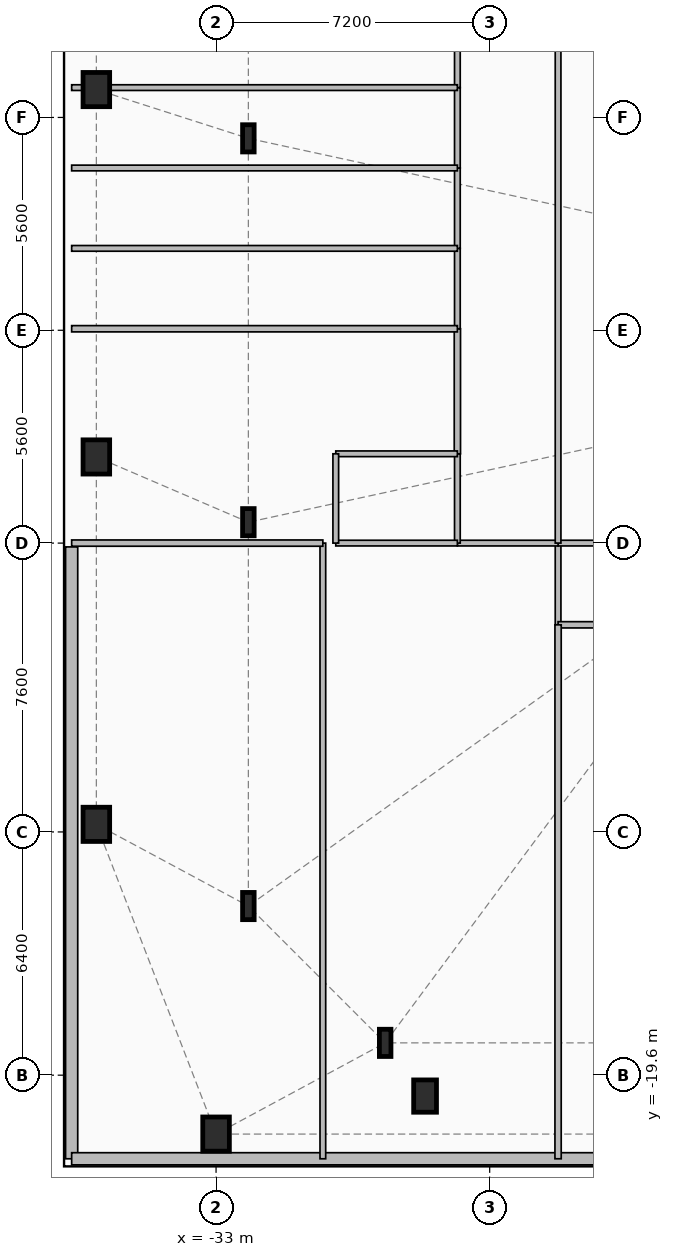
"""IFC4 building model, lengths in metres.
Left out: names, types, materials, properties, quantities, classifications, styles, units other than length and angle.
Written with IfcOpenShell. Run it as: python <this file> out.ifc"""

import sys

from ifc_helpers import new_model, si_unit, direction, frame, frame_2d, origin, origin_2d, place, context, subcontext, project, spatial, rectangle, i_section, extrude, element, fill, save


model = new_model("IFC4")
c1 = context("Model", 3, precision=1e-05, world=origin(), true_north=direction((0.0, 1.0)))
c2 = subcontext(c1, "Body", "Model", "MODEL_VIEW")
j1 = project(units=[si_unit("LENGTHUNIT", "METRE"), si_unit("PLANEANGLEUNIT", "RADIAN")], contexts=[c1])
p1 = place(None, origin())
s1 = spatial("IfcSite", under=j1, at=p1, CompositionType="ELEMENT")
p2 = place(p1, origin())
s2 = spatial("IfcBuilding", under=s1, at=p2, CompositionType="ELEMENT")
p3 = place(p2, frame((0.0, 0.0, 22.5)))
s3 = spatial("IfcBuildingStorey", under=s2, at=p3, CompositionType="ELEMENT", Elevation=22.5)
for number, where, z_axis, x_axis in (
    (1, (-33.0, -21.15, 0.0), (0.0, 0.0, 1.0), (1.0, 0.0, 0.0)),
    (2, (-36.15, -13.0, 0.0), (0.0, 0.0, 1.0), (1.0, 0.0, 0.0)),
    (3, (-36.15, -3.333, 0.0), (0.0, 0.0, 1.0), (1.0, 0.0, 0.0)),
    (4, (-36.15, 6.333, 0.0), (0.0, 0.0, 1.0), (1.0, 0.0, 0.0)),
):
    element("IfcColumn", number, at=place(p3, frame(where, z_axis=z_axis, x_axis=x_axis)), inside=s3, PredefinedType="COLUMN", context=c2, shape_type="SweptSolid", body=[
        extrude(rectangle(XDim=0.7, YDim=0.9, at=origin_2d()), origin(), (0.0, 0.0, 1.0), 4.5),
    ])
p4 = place(p3, frame((-27.5, -20.15, 0.0), z_axis=(0.0, 0.0, 1.0), x_axis=(1.0, 0.0, 0.0)))
e5 = element("IfcColumn", 5, at=p4, inside=s3, PredefinedType="PILASTER", context=c2, shape_type="SweptSolid", body=[
    extrude(rectangle(XDim=0.6, YDim=0.85, at=origin_2d()), origin(), (0.0, 0.0, 1.0), 4.5),
])
for number, where, z_axis, x_axis in (
    (6, (-28.55, -18.75, 0.0), (0.0, 0.0, 1.0), (1.0, 0.0, 0.0)),
    (7, (-32.15, 5.05, 0.0), (0.0, 0.0, 1.0), (1.0, 0.0, 0.0)),
    (8, (-32.15, -5.05, 0.0), (0.0, 0.0, 1.0), (1.0, 0.0, 0.0)),
    (9, (-32.15, -15.15, 0.0), (0.0, 0.0, 1.0), (1.0, 0.0, 0.0)),
):
    element("IfcColumn", number, at=place(p3, frame(where, z_axis=z_axis, x_axis=x_axis)), inside=s3, PredefinedType="COLUMN", context=c2, shape_type="SweptSolid", body=[
        extrude(i_section(OverallWidth=0.304, OverallDepth=0.716, WebThickness=0.021, FlangeThickness=0.04, FilletRadius=0.027, at=origin_2d()), origin(), (0.0, 0.0, 1.0), 4.5),
    ])
p5 = place(p3, frame((-36.8, -21.8, 0.0), z_axis=(0.0, 0.0, 1.0), x_axis=(0.0, 1.0, 0.0)))
e10 = element("IfcWall", 10, at=p5, inside=s3, PredefinedType="SOLIDWALL", context=c2, shape_type="SweptSolid", body=[
    extrude(rectangle(XDim=16.1, YDim=0.32, at=frame_2d((8.05, 0.0))), origin(), (0.0, 0.0, 1.0), 4.16),
])
p6 = place(p5, frame((5.067, 0.0, 0.85)))
e11 = element("IfcOpeningElement", 11, at=p6, cuts=e10, PredefinedType="OPENING", context=c2, shape_type="SweptSolid", body=[
    extrude(rectangle(XDim=2.6, YDim=2.4, at=frame_2d((1.3, 1.2))), frame((0.0, 0.17, 0.0), z_axis=(0.0, -1.0, 0.0), x_axis=(1.0, 0.0, 0.0)), (0.0, 0.0, 1.0), 0.34),
])
p7 = place(p3, frame((36.8, -21.8, 0.0), z_axis=(0.0, 0.0, 1.0), x_axis=(-1.0, 0.0, 0.0)))
e12 = element("IfcWall", 12, at=p7, inside=s3, PredefinedType="SOLIDWALL", context=c2, shape_type="SweptSolid", body=[
    extrude(rectangle(XDim=73.6, YDim=0.32, at=frame_2d((36.8, 0.0))), origin(), (0.0, 0.0, 1.0), 4.16),
])
p8 = place(p7, frame((1.079, 0.0, 0.85)))
e13 = element("IfcOpeningElement", 13, at=p8, cuts=e12, PredefinedType="OPENING", context=c2, shape_type="SweptSolid", body=[
    extrude(rectangle(XDim=2.3, YDim=2.4, at=frame_2d((1.15, 1.2))), frame((0.0, 0.17, 0.0), z_axis=(0.0, -1.0, 0.0), x_axis=(1.0, 0.0, 0.0)), (0.0, 0.0, 1.0), 0.34),
])
p9 = place(p7, frame((8.431, 0.0, 0.85)))
e14 = element("IfcOpeningElement", 14, at=p9, cuts=e12, PredefinedType="OPENING", context=c2, shape_type="SweptSolid", body=[
    extrude(rectangle(XDim=2.6, YDim=2.4, at=frame_2d((1.3, 1.2))), frame((0.0, 0.17, 0.0), z_axis=(0.0, -1.0, 0.0), x_axis=(1.0, 0.0, 0.0)), (0.0, 0.0, 1.0), 0.34),
])
p10 = place(p7, frame((29.293, 0.0, 0.85)))
e15 = element("IfcOpeningElement", 15, at=p10, cuts=e12, PredefinedType="OPENING", context=c2, shape_type="SweptSolid", body=[
    extrude(rectangle(XDim=2.6, YDim=2.4, at=frame_2d((1.3, 1.2))), frame((0.0, 0.17, 0.0), z_axis=(0.0, -1.0, 0.0), x_axis=(1.0, 0.0, 0.0)), (0.0, 0.0, 1.0), 0.34),
])
p11 = place(p7, frame((49.195, 0.0, 0.85)))
e16 = element("IfcOpeningElement", 16, at=p11, cuts=e12, PredefinedType="OPENING", context=c2, shape_type="SweptSolid", body=[
    extrude(rectangle(XDim=2.6, YDim=2.4, at=frame_2d((1.3, 1.2))), frame((0.0, 0.17, 0.0), z_axis=(0.0, -1.0, 0.0), x_axis=(1.0, 0.0, 0.0)), (0.0, 0.0, 1.0), 0.34),
])
p12 = place(p7, frame((62.649, 0.0, 0.85)))
e17 = element("IfcOpeningElement", 17, at=p12, cuts=e12, PredefinedType="OPENING", context=c2, shape_type="SweptSolid", body=[
    extrude(rectangle(XDim=2.6, YDim=2.4, at=frame_2d((1.3, 1.2))), frame((0.0, 0.17, 0.0), z_axis=(0.0, -1.0, 0.0), x_axis=(1.0, 0.0, 0.0)), (0.0, 0.0, 1.0), 0.34),
])
p13 = place(p7, frame((70.301, 0.0, 0.85)))
e18 = element("IfcOpeningElement", 18, at=p13, cuts=e12, PredefinedType="OPENING", context=c2, shape_type="SweptSolid", body=[
    extrude(rectangle(XDim=2.3, YDim=2.4, at=frame_2d((1.15, 1.2))), frame((0.0, 0.17, 0.0), z_axis=(0.0, -1.0, 0.0), x_axis=(1.0, 0.0, 0.0)), (0.0, 0.0, 1.0), 0.34),
])
p14 = place(p3, frame((-24.0, -7.75, 0.0), z_axis=(0.0, 0.0, 1.0), x_axis=(0.0, 1.0, 0.0)))
e19 = element("IfcWall", 19, at=p14, inside=s3, PredefinedType="PARTITIONING", context=c2, shape_type="SweptSolid", body=[
    extrude(rectangle(XDim=2.15, YDim=0.15, at=frame_2d((1.075, 0.0))), origin(), (0.0, 0.0, 1.0), 4.16),
])
p15 = place(p14, frame((0.625, 0.0, 0.0)))
e20 = element("IfcOpeningElement", 20, at=p15, cuts=e19, PredefinedType="OPENING", context=c2, shape_type="SweptSolid", body=[
    extrude(rectangle(XDim=0.9, YDim=2.1, at=frame_2d((0.45, 1.05))), frame((0.0, 0.085, 0.0), z_axis=(0.0, -1.0, 0.0), x_axis=(1.0, 0.0, 0.0)), (0.0, 0.0, 1.0), 0.17),
])
p16 = place(p3, frame((-24.0, -5.6, 0.0), z_axis=(0.0, 0.0, 1.0), x_axis=(1.0, 0.0, 0.0)))
e21 = element("IfcWall", 21, at=p16, inside=s3, PredefinedType="PARTITIONING", context=c2, shape_type="SweptSolid", body=[
    extrude(rectangle(XDim=5.2, YDim=0.15, at=frame_2d((2.6, 0.0))), origin(), (0.0, 0.0, 1.0), 4.16),
])
p17 = place(p3, frame((-3.32, -7.75, 0.0), z_axis=(0.0, 0.0, 1.0), x_axis=(-1.0, 0.0, 0.0)))
e22 = element("IfcWall", 22, at=p17, inside=s3, PredefinedType="PARTITIONING", context=c2, shape_type="SweptSolid", body=[
    extrude(rectangle(XDim=20.68, YDim=0.165, at=frame_2d((10.34, 0.0))), origin(), (0.0, 0.0, 1.0), 4.16),
])
p18 = place(p17, frame((9.64, 0.0, 0.0)))
e23 = element("IfcOpeningElement", 23, at=p18, cuts=e22, PredefinedType="OPENING", context=c2, shape_type="SweptSolid", body=[
    extrude(rectangle(XDim=1.4, YDim=2.3, at=frame_2d((0.7, 1.15))), frame((0.0, 0.093, 0.0), z_axis=(0.0, -1.0, 0.0), x_axis=(1.0, 0.0, 0.0)), (0.0, 0.0, 1.0), 0.185),
])
p19 = place(p3, frame((-24.0, -5.6, 0.0), z_axis=(0.0, 0.0, 1.0), x_axis=(-1.0, 0.0, 0.0)))
e24 = element("IfcWall", 24, at=p19, inside=s3, PredefinedType="PARTITIONING", context=c2, shape_type="SweptSolid", body=[
    extrude(rectangle(XDim=2.65, YDim=0.15, at=frame_2d((1.325, 0.0))), origin(), (0.0, 0.0, 1.0), 4.16),
])
p20 = place(p19, frame((0.965, 0.0, 0.0)))
e25 = element("IfcOpeningElement", 25, at=p20, cuts=e24, PredefinedType="OPENING", context=c2, shape_type="SweptSolid", body=[
    extrude(rectangle(XDim=1.05, YDim=2.15, at=frame_2d((0.525, 1.075))), frame((0.0, 0.085, 0.0), z_axis=(0.0, -1.0, 0.0), x_axis=(1.0, 0.0, 0.0)), (0.0, 0.0, 1.0), 0.17),
])
p21 = place(p3, frame((-26.65, -5.6, 0.0), z_axis=(0.0, 0.0, 1.0), x_axis=(0.0, 1.0, 0.0)))
e26 = element("IfcWall", 26, at=p21, inside=s3, PredefinedType="PLUMBINGWALL", context=c2, shape_type="SweptSolid", body=[
    extrude(rectangle(XDim=2.35, YDim=0.15, at=frame_2d((1.175, 0.0))), origin(), (0.0, 0.0, 1.0), 4.16),
])
p22 = place(p21, frame((0.834, 0.0, 0.0)))
e27 = element("IfcOpeningElement", 27, at=p22, cuts=e26, PredefinedType="OPENING", context=c2, shape_type="SweptSolid", body=[
    extrude(rectangle(XDim=0.9, YDim=2.1, at=frame_2d((0.45, 1.05))), frame((0.0, 0.085, 0.0), z_axis=(0.0, -1.0, 0.0), x_axis=(1.0, 0.0, 0.0)), (0.0, 0.0, 1.0), 0.17),
])
p23 = place(p3, frame((-26.65, -3.25, 0.0), z_axis=(0.0, 0.0, 1.0), x_axis=(0.0, 1.0, 0.0)))
e28 = element("IfcWall", 28, at=p23, inside=s3, PredefinedType="PARTITIONING", context=c2, shape_type="SweptSolid", body=[
    extrude(rectangle(XDim=3.29, YDim=0.165, at=frame_2d((1.645, 0.0))), origin(), (0.0, 0.0, 1.0), 4.16),
])
p24 = place(p23, frame((1.438, 0.0, 0.0)))
e29 = element("IfcOpeningElement", 29, at=p24, cuts=e28, PredefinedType="OPENING", context=c2, shape_type="SweptSolid", body=[
    extrude(rectangle(XDim=1.15, YDim=2.15, at=frame_2d((0.575, 1.075))), frame((0.0, 0.093, 0.0), z_axis=(0.0, -1.0, 0.0), x_axis=(1.0, 0.0, 0.0)), (0.0, 0.0, 1.0), 0.185),
])
p25 = place(p3, frame((-26.65, 0.04, 0.0), z_axis=(0.0, 0.0, 1.0), x_axis=(0.0, 1.0, 0.0)))
e30 = element("IfcWall", 30, at=p25, inside=s3, PredefinedType="PARTITIONING", context=c2, shape_type="SweptSolid", body=[
    extrude(rectangle(XDim=2.115, YDim=0.15, at=frame_2d((1.058, 0.0))), origin(), (0.0, 0.0, 1.0), 4.16),
])
p26 = place(p25, frame((0.583, 0.0, 0.0)))
e31 = element("IfcOpeningElement", 31, at=p26, cuts=e30, PredefinedType="OPENING", context=c2, shape_type="SweptSolid", body=[
    extrude(rectangle(XDim=0.95, YDim=2.1, at=frame_2d((0.475, 1.05))), frame((0.0, 0.085, 0.0), z_axis=(0.0, -1.0, 0.0), x_axis=(1.0, 0.0, 0.0)), (0.0, 0.0, 1.0), 0.17),
])
p27 = place(p3, frame((-26.65, 2.155, 0.0), z_axis=(0.0, 0.0, 1.0), x_axis=(0.0, 1.0, 0.0)))
e32 = element("IfcWall", 32, at=p27, inside=s3, PredefinedType="PARTITIONING", context=c2, shape_type="SweptSolid", body=[
    extrude(rectangle(XDim=2.115, YDim=0.15, at=frame_2d((1.058, 0.0))), origin(), (0.0, 0.0, 1.0), 4.16),
])
p28 = place(p27, frame((0.583, 0.0, 0.0)))
e33 = element("IfcOpeningElement", 33, at=p28, cuts=e32, PredefinedType="OPENING", context=c2, shape_type="SweptSolid", body=[
    extrude(rectangle(XDim=0.95, YDim=2.1, at=frame_2d((0.475, 1.05))), frame((0.0, 0.085, 0.0), z_axis=(0.0, -1.0, 0.0), x_axis=(1.0, 0.0, 0.0)), (0.0, 0.0, 1.0), 0.17),
])
p29 = place(p3, frame((-26.65, 4.27, 0.0), z_axis=(0.0, 0.0, 1.0), x_axis=(0.0, 1.0, 0.0)))
e34 = element("IfcWall", 34, at=p29, inside=s3, PredefinedType="PARTITIONING", context=c2, shape_type="SweptSolid", body=[
    extrude(rectangle(XDim=2.115, YDim=0.15, at=frame_2d((1.058, 0.0))), origin(), (0.0, 0.0, 1.0), 4.16),
])
p30 = place(p29, frame((0.583, 0.0, 0.0)))
e35 = element("IfcOpeningElement", 35, at=p30, cuts=e34, PredefinedType="OPENING", context=c2, shape_type="SweptSolid", body=[
    extrude(rectangle(XDim=0.95, YDim=2.1, at=frame_2d((0.475, 1.05))), frame((0.0, 0.085, 0.0), z_axis=(0.0, -1.0, 0.0), x_axis=(1.0, 0.0, 0.0)), (0.0, 0.0, 1.0), 0.17),
])
p31 = place(p3, frame((-26.65, 6.385, 0.0), z_axis=(0.0, 0.0, 1.0), x_axis=(0.0, 1.0, 0.0)))
e36 = element("IfcWall", 36, at=p31, inside=s3, PredefinedType="PARTITIONING", context=c2, shape_type="SweptSolid", body=[
    extrude(rectangle(XDim=2.115, YDim=0.15, at=frame_2d((1.058, 0.0))), origin(), (0.0, 0.0, 1.0), 4.16),
])
p32 = place(p31, frame((0.583, 0.0, 0.0)))
e37 = element("IfcOpeningElement", 37, at=p32, cuts=e36, PredefinedType="OPENING", context=c2, shape_type="SweptSolid", body=[
    extrude(rectangle(XDim=0.95, YDim=2.1, at=frame_2d((0.475, 1.05))), frame((0.0, 0.085, 0.0), z_axis=(0.0, -1.0, 0.0), x_axis=(1.0, 0.0, 0.0)), (0.0, 0.0, 1.0), 0.17),
])
p33 = place(p3, frame((-24.0, 8.5, 0.0), z_axis=(0.0, 0.0, 1.0), x_axis=(0.0, -1.0, 0.0)))
e38 = element("IfcWall", 38, at=p33, inside=s3, PredefinedType="PARTITIONING", context=c2, shape_type="SweptSolid", body=[
    extrude(rectangle(XDim=14.1, YDim=0.15, at=frame_2d((7.05, 0.0))), origin(), (0.0, 0.0, 1.0), 4.16),
])
p34 = place(p3, frame((-30.19, -21.8, 0.0), z_axis=(0.0, 0.0, 1.0), x_axis=(0.0, 1.0, 0.0)))
e39 = element("IfcWall", 39, at=p34, inside=s3, PredefinedType="PARTITIONING", context=c2, shape_type="SweptSolid", body=[
    extrude(rectangle(XDim=16.2, YDim=0.15, at=frame_2d((8.1, 0.0))), origin(), (0.0, 0.0, 1.0), 4.16),
])
p35 = place(p34, frame((11.073, 0.0, 0.0)))
e40 = element("IfcOpeningElement", 40, at=p35, cuts=e39, PredefinedType="OPENING", context=c2, shape_type="SweptSolid", body=[
    extrude(rectangle(XDim=1.05, YDim=2.15, at=frame_2d((0.525, 1.075))), frame((0.0, 0.085, 0.0), z_axis=(0.0, -1.0, 0.0), x_axis=(1.0, 0.0, 0.0)), (0.0, 0.0, 1.0), 0.17),
])
p36 = place(p3, frame((-29.85, -5.6, 0.0), z_axis=(0.0, 0.0, 1.0), x_axis=(1.0, 0.0, 0.0)))
e41 = element("IfcWall", 41, at=p36, inside=s3, PredefinedType="PLUMBINGWALL", context=c2, shape_type="SweptSolid", body=[
    extrude(rectangle(XDim=3.2, YDim=0.15, at=frame_2d((1.6, 0.0))), origin(), (0.0, 0.0, 1.0), 4.16),
])
p37 = place(p3, frame((-24.0, -7.75, 0.0), z_axis=(0.0, 0.0, 1.0), x_axis=(0.0, -1.0, 0.0)))
e42 = element("IfcWall", 42, at=p37, inside=s3, PredefinedType="PARTITIONING", context=c2, shape_type="SweptSolid", body=[
    extrude(rectangle(XDim=14.05, YDim=0.165, at=frame_2d((7.025, 0.0))), origin(), (0.0, 0.0, 1.0), 4.16),
])
p38 = place(p3, frame((-36.8, -5.6, 0.0), z_axis=(0.0, 0.0, 1.0), x_axis=(1.0, 0.0, 0.0)))
e43 = element("IfcWall", 43, at=p38, inside=s3, PredefinedType="PARTITIONING", context=c2, shape_type="SweptSolid", body=[
    extrude(rectangle(XDim=6.61, YDim=0.165, at=frame_2d((3.305, 0.0))), origin(), (0.0, 0.0, 1.0), 4.16),
])
p39 = place(p3, frame((-29.85, -3.25, 0.0), z_axis=(0.0, 0.0, 1.0), x_axis=(1.0, 0.0, 0.0)))
e44 = element("IfcWall", 44, at=p39, inside=s3, PredefinedType="PLUMBINGWALL", context=c2, shape_type="SweptSolid", body=[
    extrude(rectangle(XDim=3.2, YDim=0.15, at=frame_2d((1.6, 0.0))), origin(), (0.0, 0.0, 1.0), 4.16),
])
p40 = place(p3, frame((-29.85, -5.6, 0.0), z_axis=(0.0, 0.0, 1.0), x_axis=(0.0, 1.0, 0.0)))
e45 = element("IfcWall", 45, at=p40, inside=s3, PredefinedType="PLUMBINGWALL", context=c2, shape_type="SweptSolid", body=[
    extrude(rectangle(XDim=2.35, YDim=0.15, at=frame_2d((1.175, 0.0))), origin(), (0.0, 0.0, 1.0), 4.16),
])
p41 = place(p3, frame((-36.8, 0.04, 0.0), z_axis=(0.0, 0.0, 1.0), x_axis=(1.0, 0.0, 0.0)))
e46 = element("IfcWall", 46, at=p41, inside=s3, PredefinedType="PARTITIONING", context=c2, shape_type="SweptSolid", body=[
    extrude(rectangle(XDim=10.15, YDim=0.165, at=frame_2d((5.075, 0.0))), origin(), (0.0, 0.0, 1.0), 4.16),
])
p42 = place(p3, frame((-36.8, 2.155, 0.0), z_axis=(0.0, 0.0, 1.0), x_axis=(1.0, 0.0, 0.0)))
e47 = element("IfcWall", 47, at=p42, inside=s3, PredefinedType="PARTITIONING", context=c2, shape_type="SweptSolid", body=[
    extrude(rectangle(XDim=10.15, YDim=0.15, at=frame_2d((5.075, 0.0))), origin(), (0.0, 0.0, 1.0), 4.16),
])
p43 = place(p3, frame((-36.8, 4.27, 0.0), z_axis=(0.0, 0.0, 1.0), x_axis=(1.0, 0.0, 0.0)))
e48 = element("IfcWall", 48, at=p43, inside=s3, PredefinedType="PARTITIONING", context=c2, shape_type="SweptSolid", body=[
    extrude(rectangle(XDim=10.15, YDim=0.15, at=frame_2d((5.075, 0.0))), origin(), (0.0, 0.0, 1.0), 3.645),
])
p44 = place(p3, frame((-36.8, 6.385, 0.0), z_axis=(0.0, 0.0, 1.0), x_axis=(1.0, 0.0, 0.0)))
e49 = element("IfcWall", 49, at=p44, inside=s3, PredefinedType="PARTITIONING", context=c2, shape_type="SweptSolid", body=[
    extrude(rectangle(XDim=10.15, YDim=0.15, at=frame_2d((5.075, 0.0))), origin(), (0.0, 0.0, 1.0), 3.545),
])
p45 = place(p6, origin())
e50 = element("IfcWindow", 50, at=p45, inside=s3, PartitioningType="SINGLE_PANEL", PredefinedType="WINDOW", context=c2, shape_type="SweptSolid", body=[
    extrude(rectangle(XDim=2.6, YDim=2.4, at=frame_2d((1.3, 1.2))), frame((0.0, 0.03, 0.0), z_axis=(0.0, -1.0, 0.0), x_axis=(1.0, 0.0, 0.0)), (0.0, 0.0, 1.0), 0.06),
])
fill(e11, e50)
p46 = place(p12, origin())
e51 = element("IfcWindow", 51, at=p46, inside=s3, PartitioningType="SINGLE_PANEL", PredefinedType="WINDOW", context=c2, shape_type="SweptSolid", body=[
    extrude(rectangle(XDim=2.6, YDim=2.4, at=frame_2d((1.3, 1.2))), frame((0.0, 0.03, 0.0), z_axis=(0.0, -1.0, 0.0), x_axis=(1.0, 0.0, 0.0)), (0.0, 0.0, 1.0), 0.06),
])
fill(e17, e51)
p47 = place(p13, origin())
e52 = element("IfcWindow", 52, at=p47, inside=s3, PartitioningType="SINGLE_PANEL", PredefinedType="WINDOW", context=c2, shape_type="SweptSolid", body=[
    extrude(rectangle(XDim=2.3, YDim=2.4, at=frame_2d((1.15, 1.2))), frame((0.0, 0.03, 0.0), z_axis=(0.0, -1.0, 0.0), x_axis=(1.0, 0.0, 0.0)), (0.0, 0.0, 1.0), 0.06),
])
fill(e18, e52)
p48 = place(p15, origin())
e53 = element("IfcDoor", 53, at=p48, inside=s3, OperationType="SINGLE_SWING_RIGHT", PredefinedType="DOOR", context=c2, shape_type="SweptSolid", body=[
    extrude(rectangle(XDim=0.9, YDim=2.1, at=frame_2d((0.45, 1.05))), frame((0.0, 0.025, 0.0), z_axis=(0.0, -1.0, 0.0), x_axis=(1.0, 0.0, 0.0)), (0.0, 0.0, 1.0), 0.05),
])
fill(e20, e53)
p49 = place(p20, origin())
e54 = element("IfcDoor", 54, at=p49, inside=s3, OperationType="SINGLE_SWING_LEFT", PredefinedType="DOOR", context=c2, shape_type="SweptSolid", body=[
    extrude(rectangle(XDim=1.05, YDim=2.15, at=frame_2d((0.525, 1.075))), frame((0.0, 0.025, 0.0), z_axis=(0.0, -1.0, 0.0), x_axis=(1.0, 0.0, 0.0)), (0.0, 0.0, 1.0), 0.05),
])
fill(e25, e54)
p50 = place(p22, origin())
e55 = element("IfcDoor", 55, at=p50, inside=s3, OperationType="SINGLE_SWING_RIGHT", PredefinedType="DOOR", context=c2, shape_type="SweptSolid", body=[
    extrude(rectangle(XDim=0.9, YDim=2.1, at=frame_2d((0.45, 1.05))), frame((0.0, 0.025, 0.0), z_axis=(0.0, -1.0, 0.0), x_axis=(1.0, 0.0, 0.0)), (0.0, 0.0, 1.0), 0.05),
])
fill(e27, e55)
p51 = place(p24, origin())
e56 = element("IfcDoor", 56, at=p51, inside=s3, OperationType="SINGLE_SWING_LEFT", PredefinedType="DOOR", context=c2, shape_type="SweptSolid", body=[
    extrude(rectangle(XDim=1.15, YDim=2.15, at=frame_2d((0.575, 1.075))), frame((0.0, 0.025, 0.0), z_axis=(0.0, -1.0, 0.0), x_axis=(1.0, 0.0, 0.0)), (0.0, 0.0, 1.0), 0.05),
])
fill(e29, e56)
p52 = place(p26, origin())
e57 = element("IfcDoor", 57, at=p52, inside=s3, OperationType="SINGLE_SWING_RIGHT", PredefinedType="DOOR", context=c2, shape_type="SweptSolid", body=[
    extrude(rectangle(XDim=0.95, YDim=2.1, at=frame_2d((0.475, 1.05))), frame((0.0, 0.025, 0.0), z_axis=(0.0, -1.0, 0.0), x_axis=(1.0, 0.0, 0.0)), (0.0, 0.0, 1.0), 0.05),
])
fill(e31, e57)
p53 = place(p28, origin())
e58 = element("IfcDoor", 58, at=p53, inside=s3, OperationType="SINGLE_SWING_LEFT", PredefinedType="DOOR", context=c2, shape_type="SweptSolid", body=[
    extrude(rectangle(XDim=0.95, YDim=2.1, at=frame_2d((0.475, 1.05))), frame((0.0, 0.025, 0.0), z_axis=(0.0, -1.0, 0.0), x_axis=(1.0, 0.0, 0.0)), (0.0, 0.0, 1.0), 0.05),
])
fill(e33, e58)
p54 = place(p30, origin())
e59 = element("IfcDoor", 59, at=p54, inside=s3, OperationType="SINGLE_SWING_RIGHT", PredefinedType="DOOR", context=c2, shape_type="SweptSolid", body=[
    extrude(rectangle(XDim=0.95, YDim=2.1, at=frame_2d((0.475, 1.05))), frame((0.0, 0.025, 0.0), z_axis=(0.0, -1.0, 0.0), x_axis=(1.0, 0.0, 0.0)), (0.0, 0.0, 1.0), 0.05),
])
fill(e35, e59)
p55 = place(p32, origin())
e60 = element("IfcDoor", 60, at=p55, inside=s3, OperationType="SINGLE_SWING_LEFT", PredefinedType="DOOR", context=c2, shape_type="SweptSolid", body=[
    extrude(rectangle(XDim=0.95, YDim=2.1, at=frame_2d((0.475, 1.05))), frame((0.0, 0.025, 0.0), z_axis=(0.0, -1.0, 0.0), x_axis=(1.0, 0.0, 0.0)), (0.0, 0.0, 1.0), 0.05),
])
fill(e37, e60)
p56 = place(p35, origin())
e61 = element("IfcDoor", 61, at=p56, inside=s3, OperationType="SINGLE_SWING_LEFT", PredefinedType="DOOR", context=c2, shape_type="SweptSolid", body=[
    extrude(rectangle(XDim=1.05, YDim=2.15, at=frame_2d((0.525, 1.075))), frame((0.0, 0.025, 0.0), z_axis=(0.0, -1.0, 0.0), x_axis=(1.0, 0.0, 0.0)), (0.0, 0.0, 1.0), 0.05),
])
fill(e40, e61)
save(model, sys.argv[1])
